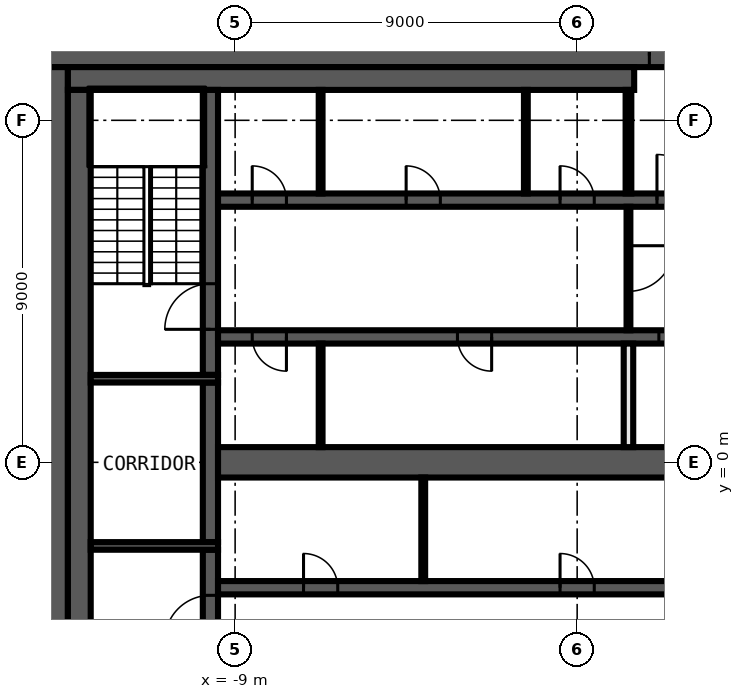
"""IFC4 building model, lengths in metres.
Left out: names, types, materials, properties, quantities, classifications, styles, units other than length and angle.
Written with IfcOpenShell. Run it as: python <this file> out.ifc"""

import sys

from ifc_helpers import new_model, si_unit, direction, frame, frame_2d, origin, place, context, subcontext, project, spatial, rectangle, extrude, element, fill, save


model = new_model("IFC4")
c1 = context("Model", 3, precision=1e-05, world=origin(), true_north=direction((0.0, 1.0)))
c2 = subcontext(c1, "Body", "Model", "MODEL_VIEW")
j1 = project(units=[si_unit("LENGTHUNIT", "METRE"), si_unit("PLANEANGLEUNIT", "RADIAN")], contexts=[c1])
p1 = place(None, origin())
s1 = spatial("IfcSite", under=j1, at=p1, CompositionType="ELEMENT")
p2 = place(p1, origin())
s2 = spatial("IfcBuilding", under=s1, at=p2, CompositionType="ELEMENT")
p3 = place(p2, frame((0.0, 0.0, 363.2)))
s3 = spatial("IfcBuildingStorey", under=s2, at=p3, CompositionType="ELEMENT", Elevation=363.2)
p4 = place(p3, frame((-11.138, 20.28, 0.0), z_axis=(0.0, 0.0, 1.0), x_axis=(-0.441342255748, -0.897338850876, 0.0)))
e1 = element("IfcWall", 1, at=p4, inside=s3, PredefinedType="SOLIDWALL", context=c2, shape_type="SweptSolid", body=[
    extrude(rectangle(XDim=28.805, YDim=0.25, at=frame_2d((14.403, 0.0))), origin(), (0.0, 0.0, 1.0), 3.8),
])
p5 = place(p3, frame((-14.0, 10.7, 0.0), z_axis=(0.0, 0.0, 1.0), x_axis=(1.0, 0.0, 0.0)))
e2 = element("IfcWall", 2, at=p5, inside=s3, PredefinedType="SHEAR", context=c2, shape_type="SweptSolid", body=[
    extrude(rectangle(XDim=28.0, YDim=0.6, at=frame_2d((14.0, 0.0))), origin(), (0.0, 0.0, 1.0), 3.8),
])
p6 = place(p5, frame((15.9, 0.0, 0.0)))
e3 = element("IfcOpeningElement", 3, at=p6, cuts=e2, PredefinedType="OPENING", context=c2, shape_type="SweptSolid", body=[
    extrude(rectangle(XDim=1.6, YDim=2.1, at=frame_2d((0.8, 1.05))), frame((0.0, 0.31, 0.0), z_axis=(0.0, -1.0, 0.0), x_axis=(1.0, 0.0, 0.0)), (0.0, 0.0, 1.0), 0.62),
])
p7 = place(p3, frame((-13.7, -10.4, 0.0), z_axis=(0.0, 0.0, 1.0), x_axis=(0.0, 1.0, 0.0)))
e4 = element("IfcWall", 4, at=p7, inside=s3, PredefinedType="SHEAR", context=c2, shape_type="SweptSolid", body=[
    extrude(rectangle(XDim=20.8, YDim=0.6, at=frame_2d((10.4, 0.0))), origin(), (0.0, 0.0, 1.0), 3.8),
])
p8 = place(p3, frame((-13.4, 10.1, 0.0), z_axis=(0.0, 0.0, 1.0), x_axis=(1.0, 0.0, 0.0)))
e5 = element("IfcWall", 5, at=p8, inside=s3, PredefinedType="SHEAR", context=c2, shape_type="SweptSolid", body=[
    extrude(rectangle(XDim=14.9, YDim=0.6, at=frame_2d((7.45, 0.0))), origin(), (0.0, 0.0, 1.0), 3.8),
])
p9 = place(p3, frame((-13.1, -9.8, 0.0), z_axis=(0.0, 0.0, 1.0), x_axis=(0.0, 1.0, 0.0)))
e6 = element("IfcWall", 6, at=p9, inside=s3, PredefinedType="SHEAR", context=c2, shape_type="SweptSolid", body=[
    extrude(rectangle(XDim=19.6, YDim=0.6, at=frame_2d((9.8, 0.0))), origin(), (0.0, 0.0, 1.0), 3.8),
])
p10 = place(p3, frame((-9.65, -9.8, 0.0), z_axis=(0.0, 0.0, 1.0), x_axis=(0.0, 1.0, 0.0)))
e7 = element("IfcWall", 7, at=p10, inside=s3, PredefinedType="SHEAR", context=c2, shape_type="SweptSolid", body=[
    extrude(rectangle(XDim=7.5, YDim=0.4, at=frame_2d((3.75, 0.0))), origin(), (0.0, 0.0, 1.0), 3.8),
])
p11 = place(p10, frame((5.1, 0.0, 0.0)))
e8 = element("IfcOpeningElement", 8, at=p11, cuts=e7, PredefinedType="OPENING", context=c2, shape_type="SweptSolid", body=[
    extrude(rectangle(XDim=1.2, YDim=2.1, at=frame_2d((0.6, 1.05))), frame((0.0, 0.21, 0.0), z_axis=(0.0, -1.0, 0.0), x_axis=(1.0, 0.0, 0.0)), (0.0, 0.0, 1.0), 0.42),
])
p12 = place(p3, frame((-9.65, -2.1, 0.0), z_axis=(0.0, 0.0, 1.0), x_axis=(0.0, 1.0, 0.0)))
e9 = element("IfcWall", 9, at=p12, inside=s3, PredefinedType="SHEAR", context=c2, shape_type="SweptSolid", body=[
    extrude(rectangle(XDim=4.2, YDim=0.4, at=frame_2d((2.1, 0.0))), origin(), (0.0, 0.0, 1.0), 3.8),
])
p13 = place(p3, frame((-9.65, 2.3, 0.0), z_axis=(0.0, 0.0, 1.0), x_axis=(0.0, 1.0, 0.0)))
e10 = element("IfcWall", 10, at=p13, inside=s3, PredefinedType="SHEAR", context=c2, shape_type="SweptSolid", body=[
    extrude(rectangle(XDim=7.5, YDim=0.4, at=frame_2d((3.75, 0.0))), origin(), (0.0, 0.0, 1.0), 3.8),
])
p14 = place(p13, frame((1.2, 0.0, 0.0)))
e11 = element("IfcOpeningElement", 11, at=p14, cuts=e10, PredefinedType="OPENING", context=c2, shape_type="SweptSolid", body=[
    extrude(rectangle(XDim=1.2, YDim=2.1, at=frame_2d((0.6, 1.05))), frame((0.0, 0.21, 0.0), z_axis=(0.0, -1.0, 0.0), x_axis=(1.0, 0.0, 0.0)), (0.0, 0.0, 1.0), 0.42),
])
for number, where, z_axis, x_axis in (
    (12, (-9.45, 2.2, 0.0), (0.0, 0.0, 1.0), (-1.0, 0.0, 0.0)),
    (13, (-9.45, -2.2, 0.0), (0.0, 0.0, 1.0), (-1.0, 0.0, 0.0)),
):
    element("IfcWall", number, at=place(p3, frame(where, z_axis=z_axis, x_axis=x_axis)), inside=s3, PredefinedType="SHEAR", context=c2, shape_type="SweptSolid", body=[
        extrude(rectangle(XDim=3.35, YDim=0.2, at=frame_2d((1.675, 0.0))), origin(), (0.0, 0.0, 1.0), 3.8),
    ])
p15 = place(p3, frame((-9.45, 6.9, 0.0), z_axis=(0.0, 0.0, 1.0), x_axis=(1.0, 0.0, 0.0)))
e14 = element("IfcWall", 14, at=p15, inside=s3, PredefinedType="SHEAR", context=c2, shape_type="SweptSolid", body=[
    extrude(rectangle(XDim=18.9, YDim=0.35, at=frame_2d((9.45, 0.0))), origin(), (0.0, 0.0, 1.0), 3.8),
])
p16 = place(p15, frame((11.55, 0.0, 0.0)))
e15 = element("IfcOpeningElement", 15, at=p16, cuts=e14, PredefinedType="OPENING", context=c2, shape_type="SweptSolid", body=[
    extrude(rectangle(XDim=1.2, YDim=2.1, at=frame_2d((0.6, 1.05))), frame((0.0, 0.185, 0.0), z_axis=(0.0, -1.0, 0.0), x_axis=(1.0, 0.0, 0.0)), (0.0, 0.0, 1.0), 0.37),
])
p17 = place(p15, frame((14.3, 0.0, 0.0)))
e16 = element("IfcOpeningElement", 16, at=p17, cuts=e14, PredefinedType="OPENING", context=c2, shape_type="SweptSolid", body=[
    extrude(rectangle(XDim=1.1, YDim=2.1, at=frame_2d((0.55, 1.05))), frame((0.0, 0.185, 0.0), z_axis=(0.0, -1.0, 0.0), x_axis=(1.0, 0.0, 0.0)), (0.0, 0.0, 1.0), 0.37),
])
p18 = place(p15, frame((17.0, 0.0, 0.0)))
e17 = element("IfcOpeningElement", 17, at=p18, cuts=e14, PredefinedType="OPENING", context=c2, shape_type="SweptSolid", body=[
    extrude(rectangle(XDim=1.1, YDim=2.1, at=frame_2d((0.55, 1.05))), frame((0.0, 0.185, 0.0), z_axis=(0.0, -1.0, 0.0), x_axis=(1.0, 0.0, 0.0)), (0.0, 0.0, 1.0), 0.37),
])
p19 = place(p15, frame((0.9, 0.0, 0.0)))
e18 = element("IfcOpeningElement", 18, at=p19, cuts=e14, PredefinedType="OPENING", context=c2, shape_type="SweptSolid", body=[
    extrude(rectangle(XDim=0.9, YDim=2.1, at=frame_2d((0.45, 1.05))), frame((0.0, 0.185, 0.0), z_axis=(0.0, -1.0, 0.0), x_axis=(1.0, 0.0, 0.0)), (0.0, 0.0, 1.0), 0.37),
])
p20 = place(p15, frame((4.95, 0.0, 0.0)))
e19 = element("IfcOpeningElement", 19, at=p20, cuts=e14, PredefinedType="OPENING", context=c2, shape_type="SweptSolid", body=[
    extrude(rectangle(XDim=0.9, YDim=2.1, at=frame_2d((0.45, 1.05))), frame((0.0, 0.185, 0.0), z_axis=(0.0, -1.0, 0.0), x_axis=(1.0, 0.0, 0.0)), (0.0, 0.0, 1.0), 0.37),
])
p21 = place(p15, frame((9.0, 0.0, 0.0)))
e20 = element("IfcOpeningElement", 20, at=p21, cuts=e14, PredefinedType="OPENING", context=c2, shape_type="SweptSolid", body=[
    extrude(rectangle(XDim=0.9, YDim=2.1, at=frame_2d((0.45, 1.05))), frame((0.0, 0.185, 0.0), z_axis=(0.0, -1.0, 0.0), x_axis=(1.0, 0.0, 0.0)), (0.0, 0.0, 1.0), 0.37),
])
p22 = place(p3, frame((9.45, 3.3, 0.0), z_axis=(0.0, 0.0, 1.0), x_axis=(-1.0, 0.0, 0.0)))
e21 = element("IfcWall", 21, at=p22, inside=s3, PredefinedType="SHEAR", context=c2, shape_type="SweptSolid", body=[
    extrude(rectangle(XDim=18.9, YDim=0.35, at=frame_2d((9.45, 0.0))), origin(), (0.0, 0.0, 1.0), 3.8),
])
p23 = place(p22, frame((6.2, 0.0, 0.0)))
e22 = element("IfcOpeningElement", 22, at=p23, cuts=e21, PredefinedType="OPENING", context=c2, shape_type="SweptSolid", body=[
    extrude(rectangle(XDim=1.1, YDim=2.1, at=frame_2d((0.55, 1.05))), frame((0.0, 0.185, 0.0), z_axis=(0.0, -1.0, 0.0), x_axis=(1.0, 0.0, 0.0)), (0.0, 0.0, 1.0), 0.37),
])
p24 = place(p22, frame((3.5, 0.0, 0.0)))
e23 = element("IfcOpeningElement", 23, at=p24, cuts=e21, PredefinedType="OPENING", context=c2, shape_type="SweptSolid", body=[
    extrude(rectangle(XDim=1.1, YDim=2.1, at=frame_2d((0.55, 1.05))), frame((0.0, 0.185, 0.0), z_axis=(0.0, -1.0, 0.0), x_axis=(1.0, 0.0, 0.0)), (0.0, 0.0, 1.0), 0.37),
])
p25 = place(p22, frame((0.9, 0.0, 0.0)))
e24 = element("IfcOpeningElement", 24, at=p25, cuts=e21, PredefinedType="OPENING", context=c2, shape_type="SweptSolid", body=[
    extrude(rectangle(XDim=0.9, YDim=2.1, at=frame_2d((0.45, 1.05))), frame((0.0, 0.185, 0.0), z_axis=(0.0, -1.0, 0.0), x_axis=(1.0, 0.0, 0.0)), (0.0, 0.0, 1.0), 0.37),
])
p26 = place(p22, frame((17.1, 0.0, 0.0)))
e25 = element("IfcOpeningElement", 25, at=p26, cuts=e21, PredefinedType="OPENING", context=c2, shape_type="SweptSolid", body=[
    extrude(rectangle(XDim=0.9, YDim=2.1, at=frame_2d((0.45, 1.05))), frame((0.0, 0.185, 0.0), z_axis=(0.0, -1.0, 0.0), x_axis=(1.0, 0.0, 0.0)), (0.0, 0.0, 1.0), 0.37),
])
p27 = place(p22, frame((11.7, 0.0, 0.0)))
e26 = element("IfcOpeningElement", 26, at=p27, cuts=e21, PredefinedType="OPENING", context=c2, shape_type="SweptSolid", body=[
    extrude(rectangle(XDim=0.9, YDim=2.1, at=frame_2d((0.45, 1.05))), frame((0.0, 0.185, 0.0), z_axis=(0.0, -1.0, 0.0), x_axis=(1.0, 0.0, 0.0)), (0.0, 0.0, 1.0), 0.37),
])
p28 = place(p3, frame((-9.45, -3.3, 0.0), z_axis=(0.0, 0.0, 1.0), x_axis=(1.0, 0.0, 0.0)))
e27 = element("IfcWall", 27, at=p28, inside=s3, PredefinedType="SHEAR", context=c2, shape_type="SweptSolid", body=[
    extrude(rectangle(XDim=18.9, YDim=0.35, at=frame_2d((9.45, 0.0))), origin(), (0.0, 0.0, 1.0), 3.8),
])
p29 = place(p28, frame((17.0, 0.0, 0.0)))
e28 = element("IfcOpeningElement", 28, at=p29, cuts=e27, PredefinedType="OPENING", context=c2, shape_type="SweptSolid", body=[
    extrude(rectangle(XDim=1.1, YDim=2.1, at=frame_2d((0.55, 1.05))), frame((0.0, 0.185, 0.0), z_axis=(0.0, -1.0, 0.0), x_axis=(1.0, 0.0, 0.0)), (0.0, 0.0, 1.0), 0.37),
])
p30 = place(p28, frame((2.25, 0.0, 0.0)))
e29 = element("IfcOpeningElement", 29, at=p30, cuts=e27, PredefinedType="OPENING", context=c2, shape_type="SweptSolid", body=[
    extrude(rectangle(XDim=0.9, YDim=2.1, at=frame_2d((0.45, 1.05))), frame((0.0, 0.185, 0.0), z_axis=(0.0, -1.0, 0.0), x_axis=(1.0, 0.0, 0.0)), (0.0, 0.0, 1.0), 0.37),
])
p31 = place(p28, frame((9.0, 0.0, 0.0)))
e30 = element("IfcOpeningElement", 30, at=p31, cuts=e27, PredefinedType="OPENING", context=c2, shape_type="SweptSolid", body=[
    extrude(rectangle(XDim=0.9, YDim=2.1, at=frame_2d((0.45, 1.05))), frame((0.0, 0.185, 0.0), z_axis=(0.0, -1.0, 0.0), x_axis=(1.0, 0.0, 0.0)), (0.0, 0.0, 1.0), 0.37),
])
p32 = place(p28, frame((14.4, 0.0, 0.0)))
e31 = element("IfcOpeningElement", 31, at=p32, cuts=e27, PredefinedType="OPENING", context=c2, shape_type="SweptSolid", body=[
    extrude(rectangle(XDim=0.9, YDim=2.1, at=frame_2d((0.45, 1.05))), frame((0.0, 0.185, 0.0), z_axis=(0.0, -1.0, 0.0), x_axis=(1.0, 0.0, 0.0)), (0.0, 0.0, 1.0), 0.37),
])
p33 = place(p3, frame((-9.45, 0.0, 0.0), z_axis=(0.0, 0.0, 1.0), x_axis=(1.0, 0.0, 0.0)))
e32 = element("IfcWall", 32, at=p33, inside=s3, PredefinedType="SHEAR", context=c2, shape_type="SweptSolid", body=[
    extrude(rectangle(XDim=18.9, YDim=0.8, at=frame_2d((9.45, 0.0))), origin(), (0.0, 0.0, 1.0), 3.8),
])
p34 = place(p3, frame((1.35, 7.075, 0.0), z_axis=(0.0, 0.0, 1.0), x_axis=(0.0, 1.0, 0.0)))
e33 = element("IfcWall", 33, at=p34, inside=s3, PredefinedType="PARTITIONING", context=c2, shape_type="SweptSolid", body=[
    extrude(rectangle(XDim=2.725, YDim=0.15, at=frame_2d((1.363, 0.0))), origin(), (0.0, 0.0, 1.0), 3.8),
])
p35 = place(p3, frame((1.35, 6.725, 0.0), z_axis=(0.0, 0.0, 1.0), x_axis=(0.0, -1.0, 0.0)))
e34 = element("IfcWall", 34, at=p35, inside=s3, PredefinedType="PARTITIONING", context=c2, shape_type="SweptSolid", body=[
    extrude(rectangle(XDim=3.25, YDim=0.1, at=frame_2d((1.625, 0.0))), origin(), (0.0, 0.0, 1.0), 3.8),
])
p36 = place(p35, frame((1.025, 0.0, 0.0)))
e35 = element("IfcOpeningElement", 35, at=p36, cuts=e34, PredefinedType="OPENING", context=c2, shape_type="SweptSolid", body=[
    extrude(rectangle(XDim=1.2, YDim=2.1, at=frame_2d((0.6, 1.05))), frame((0.0, 0.06, 0.0), z_axis=(0.0, -1.0, 0.0), x_axis=(1.0, 0.0, 0.0)), (0.0, 0.0, 1.0), 0.12),
])
p37 = place(p3, frame((1.35, 0.4, 0.0), z_axis=(0.0, 0.0, 1.0), x_axis=(0.0, 1.0, 0.0)))
e36 = element("IfcWall", 36, at=p37, inside=s3, PredefinedType="SOLIDWALL", context=c2, shape_type="SweptSolid", body=[
    extrude(rectangle(XDim=2.725, YDim=0.25, at=frame_2d((1.363, 0.0))), origin(), (0.0, 0.0, 1.0), 3.8),
])
for number, where, z_axis, x_axis in (
    (37, (-1.35, 7.075, 0.0), (0.0, 0.0, 1.0), (0.0, 1.0, 0.0)),
    (38, (-4.05, -3.125, 0.0), (0.0, 0.0, 1.0), (0.0, 1.0, 0.0)),
    (39, (-6.75, 0.4, 0.0), (0.0, 0.0, 1.0), (0.0, 1.0, 0.0)),
    (40, (-6.75, 7.075, 0.0), (0.0, 0.0, 1.0), (0.0, 1.0, 0.0)),
):
    element("IfcWall", number, at=place(p3, frame(where, z_axis=z_axis, x_axis=x_axis)), inside=s3, PredefinedType="PARTITIONING", context=c2, shape_type="SweptSolid", body=[
        extrude(rectangle(XDim=2.725, YDim=0.1, at=frame_2d((1.363, 0.0))), origin(), (0.0, 0.0, 1.0), 3.8),
    ])
p38 = place(p6, origin())
e41 = element("IfcDoor", 41, at=p38, inside=s3, OperationType="DOUBLE_DOOR_SINGLE_SWING", PredefinedType="DOOR", context=c2, shape_type="SweptSolid", body=[
    extrude(rectangle(XDim=1.6, YDim=2.1, at=frame_2d((0.8, 1.05))), frame((0.0, 0.025, 0.0), z_axis=(0.0, -1.0, 0.0), x_axis=(1.0, 0.0, 0.0)), (0.0, 0.0, 1.0), 0.05),
])
fill(e3, e41)
p39 = place(p16, origin())
e42 = element("IfcDoor", 42, at=p39, inside=s3, OperationType="SINGLE_SWING_LEFT", PredefinedType="DOOR", context=c2, shape_type="SweptSolid", body=[
    extrude(rectangle(XDim=1.2, YDim=2.1, at=frame_2d((0.6, 1.05))), frame((0.0, 0.025, 0.0), z_axis=(0.0, -1.0, 0.0), x_axis=(1.0, 0.0, 0.0)), (0.0, 0.0, 1.0), 0.05),
])
fill(e15, e42)
p40 = place(p23, origin())
e43 = element("IfcDoor", 43, at=p40, inside=s3, OperationType="DOUBLE_DOOR_SLIDING", PredefinedType="DOOR", context=c2, shape_type="SweptSolid", body=[
    extrude(rectangle(XDim=1.1, YDim=2.1, at=frame_2d((0.55, 1.05))), frame((0.0, 0.025, 0.0), z_axis=(0.0, -1.0, 0.0), x_axis=(1.0, 0.0, 0.0)), (0.0, 0.0, 1.0), 0.05),
])
fill(e22, e43)
p41 = place(p19, origin())
e44 = element("IfcDoor", 44, at=p41, inside=s3, OperationType="SINGLE_SWING_RIGHT", PredefinedType="DOOR", context=c2, shape_type="SweptSolid", body=[
    extrude(rectangle(XDim=0.9, YDim=2.1, at=frame_2d((0.45, 1.05))), frame((0.0, 0.025, 0.0), z_axis=(0.0, -1.0, 0.0), x_axis=(1.0, 0.0, 0.0)), (0.0, 0.0, 1.0), 0.05),
])
fill(e18, e44)
p42 = place(p20, origin())
e45 = element("IfcDoor", 45, at=p42, inside=s3, OperationType="SINGLE_SWING_LEFT", PredefinedType="DOOR", context=c2, shape_type="SweptSolid", body=[
    extrude(rectangle(XDim=0.9, YDim=2.1, at=frame_2d((0.45, 1.05))), frame((0.0, 0.025, 0.0), z_axis=(0.0, -1.0, 0.0), x_axis=(1.0, 0.0, 0.0)), (0.0, 0.0, 1.0), 0.05),
])
fill(e19, e45)
p43 = place(p21, origin())
e46 = element("IfcDoor", 46, at=p43, inside=s3, OperationType="SINGLE_SWING_RIGHT", PredefinedType="DOOR", context=c2, shape_type="SweptSolid", body=[
    extrude(rectangle(XDim=0.9, YDim=2.1, at=frame_2d((0.45, 1.05))), frame((0.0, 0.025, 0.0), z_axis=(0.0, -1.0, 0.0), x_axis=(1.0, 0.0, 0.0)), (0.0, 0.0, 1.0), 0.05),
])
fill(e20, e46)
p44 = place(p26, origin())
e47 = element("IfcDoor", 47, at=p44, inside=s3, OperationType="SINGLE_SWING_LEFT", PredefinedType="DOOR", context=c2, shape_type="SweptSolid", body=[
    extrude(rectangle(XDim=0.9, YDim=2.1, at=frame_2d((0.45, 1.05))), frame((0.0, 0.025, 0.0), z_axis=(0.0, -1.0, 0.0), x_axis=(1.0, 0.0, 0.0)), (0.0, 0.0, 1.0), 0.05),
])
fill(e25, e47)
p45 = place(p27, origin())
e48 = element("IfcDoor", 48, at=p45, inside=s3, OperationType="SINGLE_SWING_RIGHT", PredefinedType="DOOR", context=c2, shape_type="SweptSolid", body=[
    extrude(rectangle(XDim=0.9, YDim=2.1, at=frame_2d((0.45, 1.05))), frame((0.0, 0.025, 0.0), z_axis=(0.0, -1.0, 0.0), x_axis=(1.0, 0.0, 0.0)), (0.0, 0.0, 1.0), 0.05),
])
fill(e26, e48)
p46 = place(p30, origin())
e49 = element("IfcDoor", 49, at=p46, inside=s3, OperationType="SINGLE_SWING_LEFT", PredefinedType="DOOR", context=c2, shape_type="SweptSolid", body=[
    extrude(rectangle(XDim=0.9, YDim=2.1, at=frame_2d((0.45, 1.05))), frame((0.0, 0.025, 0.0), z_axis=(0.0, -1.0, 0.0), x_axis=(1.0, 0.0, 0.0)), (0.0, 0.0, 1.0), 0.05),
])
fill(e29, e49)
p47 = place(p31, origin())
e50 = element("IfcDoor", 50, at=p47, inside=s3, OperationType="SINGLE_SWING_RIGHT", PredefinedType="DOOR", context=c2, shape_type="SweptSolid", body=[
    extrude(rectangle(XDim=0.9, YDim=2.1, at=frame_2d((0.45, 1.05))), frame((0.0, 0.025, 0.0), z_axis=(0.0, -1.0, 0.0), x_axis=(1.0, 0.0, 0.0)), (0.0, 0.0, 1.0), 0.05),
])
fill(e30, e50)
p48 = place(p14, origin())
e51 = element("IfcDoor", 51, at=p48, inside=s3, OperationType="SINGLE_SWING_RIGHT", PredefinedType="DOOR", context=c2, shape_type="SweptSolid", body=[
    extrude(rectangle(XDim=1.2, YDim=2.1, at=frame_2d((0.6, 1.05))), frame((0.0, 0.025, 0.0), z_axis=(0.0, -1.0, 0.0), x_axis=(1.0, 0.0, 0.0)), (0.0, 0.0, 1.0), 0.05),
])
fill(e11, e51)
p49 = place(p11, origin())
e52 = element("IfcDoor", 52, at=p49, inside=s3, OperationType="SINGLE_SWING_LEFT", PredefinedType="DOOR", context=c2, shape_type="SweptSolid", body=[
    extrude(rectangle(XDim=1.2, YDim=2.1, at=frame_2d((0.6, 1.05))), frame((0.0, 0.025, 0.0), z_axis=(0.0, -1.0, 0.0), x_axis=(1.0, 0.0, 0.0)), (0.0, 0.0, 1.0), 0.05),
])
fill(e8, e52)
p50 = place(p36, origin())
e53 = element("IfcDoor", 53, at=p50, inside=s3, OperationType="SINGLE_SWING_LEFT", PredefinedType="DOOR", context=c2, shape_type="SweptSolid", body=[
    extrude(rectangle(XDim=1.2, YDim=2.1, at=frame_2d((0.6, 1.05))), frame((0.0, 0.025, 0.0), z_axis=(0.0, -1.0, 0.0), x_axis=(1.0, 0.0, 0.0)), (0.0, 0.0, 1.0), 0.05),
])
fill(e35, e53)
save(model, sys.argv[1])
